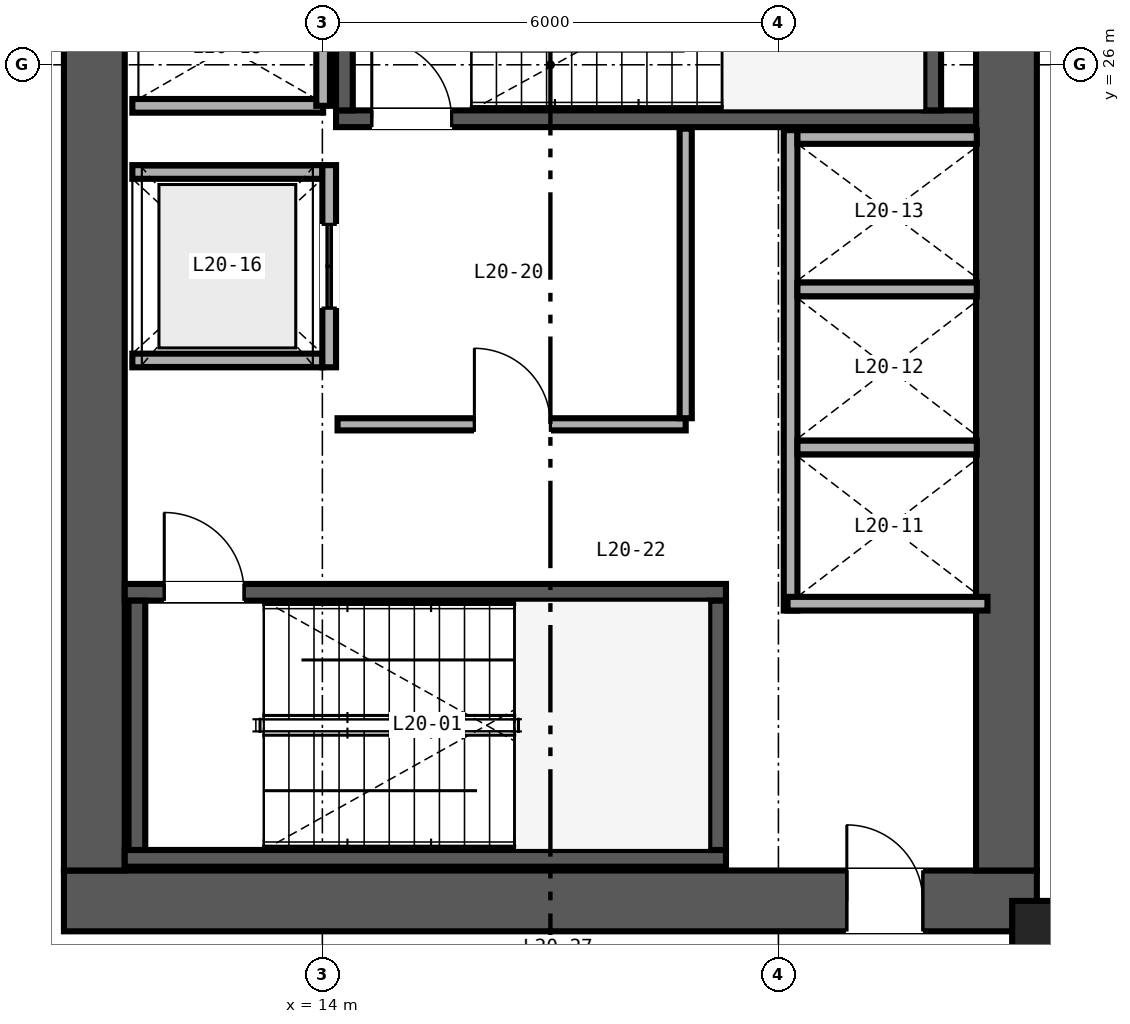
"""IFC4 building model, lengths in metres.
Left out: names, types, materials, properties, quantities, classifications, styles, units other than length and angle.
Written with IfcOpenShell. Run it as: python <this file> out.ifc"""

import sys

from ifc_helpers import new_model, si_unit, direction, frame, frame_2d, origin, origin_2d, place, context, subcontext, project, spatial, rectangle, hollow_rectangle, extrude, source, transform, mapped, element, fill, save


model = new_model("IFC4")
c1 = context("Model", 3, precision=1e-05, world=origin(), true_north=direction((0.0, 1.0)))
c2 = subcontext(c1, "Body", "Model", "MODEL_VIEW")
j1 = project(units=[si_unit("LENGTHUNIT", "METRE"), si_unit("PLANEANGLEUNIT", "RADIAN")], contexts=[c1])
p1 = place(None, origin())
s1 = spatial("IfcSite", under=j1, at=p1, CompositionType="ELEMENT")
p2 = place(p1, origin())
s2 = spatial("IfcBuilding", under=s1, at=p2, CompositionType="ELEMENT")
p3 = place(p2, frame((0.0, 0.0, 81.6)))
s3 = spatial("IfcBuildingStorey", under=s2, at=p3, CompositionType="ELEMENT", Elevation=81.6)
p4 = place(p3, frame((10.6, 15.0, 0.0), z_axis=(0.0, 0.0, 1.0), x_axis=(1.0, 0.0, 0.0)))
e1 = element("IfcWall", 1, at=p4, inside=s3, PredefinedType="SHEAR", context=c2, shape_type="SweptSolid", body=[
    extrude(rectangle(XDim=12.8, YDim=0.8, at=frame_2d((6.4, 0.0))), origin(), (0.0, 0.0, 1.0), 3.28),
])
p5 = place(p4, frame((10.3, 0.0, 0.0)))
e2 = element("IfcOpeningElement", 2, at=p5, cuts=e1, PredefinedType="OPENING", context=c2, shape_type="SweptSolid", body=[
    extrude(rectangle(XDim=1.0, YDim=2.15, at=frame_2d((0.5, 1.075))), frame((0.0, 0.41, 0.0), z_axis=(0.0, -1.0, 0.0), x_axis=(1.0, 0.0, 0.0)), (0.0, 0.0, 1.0), 0.82),
])
for number, where, z_axis, x_axis in (
    (3, (11.0, 15.4, 0.0), (0.0, 0.0, 1.0), (0.0, 1.0, 0.0)),
    (4, (23.0, 15.4, 0.0), (0.0, 0.0, 1.0), (0.0, 1.0, 0.0)),
):
    element("IfcWall", number, at=place(p3, frame(where, z_axis=z_axis, x_axis=x_axis)), inside=s3, PredefinedType="SHEAR", context=c2, shape_type="SweptSolid", body=[
        extrude(rectangle(XDim=21.2, YDim=0.8, at=frame_2d((10.6, 0.0))), origin(), (0.0, 0.0, 1.0), 3.28),
    ])
p6 = place(p3, frame((11.4, 15.56, 0.0), z_axis=(0.0, 0.0, 1.0), x_axis=(1.0, 0.0, 0.0)))
e5 = element("IfcWall", 5, at=p6, inside=s3, PredefinedType="SHEAR", context=c2, shape_type="SweptSolid", body=[
    extrude(rectangle(XDim=7.91, YDim=0.22, at=frame_2d((3.955, 0.0))), origin(), (0.0, 0.0, 1.0), 3.4),
])
p7 = place(p3, frame((11.4, 19.06, 0.0), z_axis=(0.0, 0.0, 1.0), x_axis=(1.0, 0.0, 0.0)))
e6 = element("IfcWall", 6, at=p7, inside=s3, PredefinedType="SHEAR", context=c2, shape_type="SweptSolid", body=[
    extrude(rectangle(XDim=7.91, YDim=0.22, at=frame_2d((3.955, 0.0))), origin(), (0.0, 0.0, 1.0), 3.4),
])
p8 = place(p7, frame((0.52, 0.0, 0.0)))
e7 = element("IfcOpeningElement", 7, at=p8, cuts=e6, PredefinedType="OPENING", context=c2, shape_type="SweptSolid", body=[
    extrude(rectangle(XDim=1.05, YDim=2.15, at=frame_2d((0.525, 1.075))), frame((0.0, 0.12, 0.0), z_axis=(0.0, -1.0, 0.0), x_axis=(1.0, 0.0, 0.0)), (0.0, 0.0, 1.0), 0.24),
])
for number, where, z_axis, x_axis in (
    (8, (11.56, 15.67, 0.0), (0.0, 0.0, 1.0), (0.0, 1.0, 0.0)),
    (9, (19.2, 15.67, 0.0), (0.0, 0.0, 1.0), (0.0, 1.0, 0.0)),
):
    element("IfcWall", number, at=place(p3, frame(where, z_axis=z_axis, x_axis=x_axis)), inside=s3, PredefinedType="SHEAR", context=c2, shape_type="SweptSolid", body=[
        extrude(rectangle(XDim=3.28, YDim=0.22, at=frame_2d((1.64, 0.0))), origin(), (0.0, 0.0, 1.0), 3.4),
    ])
p9 = place(p3, frame((14.18, 25.29, 0.0), z_axis=(0.0, 0.0, 1.0), x_axis=(1.0, 0.0, 0.0)))
e10 = element("IfcWall", 10, at=p9, inside=s3, PredefinedType="SHEAR", context=c2, shape_type="SweptSolid", body=[
    extrude(rectangle(XDim=8.42, YDim=0.22, at=frame_2d((4.21, 0.0))), origin(), (0.0, 0.0, 1.0), 3.4),
])
p10 = place(p9, frame((0.47, 0.0, 0.0)))
e11 = element("IfcOpeningElement", 11, at=p10, cuts=e10, PredefinedType="OPENING", context=c2, shape_type="SweptSolid", body=[
    extrude(rectangle(XDim=1.05, YDim=2.15, at=frame_2d((0.525, 1.075))), frame((0.0, 0.12, 0.0), z_axis=(0.0, -1.0, 0.0), x_axis=(1.0, 0.0, 0.0)), (0.0, 0.0, 1.0), 0.24),
])
for number, where, z_axis, x_axis in (
    (12, (14.29, 25.4, 0.0), (0.0, 0.0, 1.0), (0.0, 1.0, 0.0)),
    (13, (22.03, 25.4, 0.0), (0.0, 0.0, 1.0), (0.0, 1.0, 0.0)),
):
    element("IfcWall", number, at=place(p3, frame(where, z_axis=z_axis, x_axis=x_axis)), inside=s3, PredefinedType="SHEAR", context=c2, shape_type="SweptSolid", body=[
        extrude(rectangle(XDim=3.28, YDim=0.22, at=frame_2d((1.64, 0.0))), origin(), (0.0, 0.0, 1.0), 3.4),
    ])
m1 = source(origin(), c2, "Body", "SweptSolid", [
    extrude(hollow_rectangle(XDim=0.85, YDim=0.9, WallThickness=0.04, at=origin_2d()), origin(), (0.0, 0.0, 1.0), 3.28),
])
p11 = place(p3, frame((23.5, 14.55, 0.0), z_axis=(0.0, 0.0, 1.0), x_axis=(1.0, 0.0, 0.0)))
e14 = element("IfcColumn", 14, at=p11, inside=s3, PredefinedType="COLUMN", context=c2, shape_type="MappedRepresentation", body=[
    mapped(m1, transform((0.0, 0.0, 0.0), scale=1.0)),
])
p12 = place(p3, frame((20.16, 18.82, 0.0), z_axis=(0.0, 0.0, 1.0), x_axis=(0.0, 1.0, 0.0)))
e15 = element("IfcWall", 15, at=p12, inside=s3, PredefinedType="SOLIDWALL", context=c2, shape_type="SweptSolid", body=[
    extrude(rectangle(XDim=6.32, YDim=0.18, at=frame_2d((3.16, 0.0))), origin(), (0.0, 0.0, 1.0), 2.36),
])
p13 = place(p3, frame((20.12, 18.91, 0.0), z_axis=(0.0, 0.0, 1.0), x_axis=(1.0, 0.0, 0.0)))
e16 = element("IfcWall", 16, at=p13, inside=s3, PredefinedType="SOLIDWALL", context=c2, shape_type="SweptSolid", body=[
    extrude(rectangle(XDim=2.63, YDim=0.18, at=frame_2d((1.315, 0.0))), origin(), (0.0, 0.0, 1.0), 3.28),
])
p14 = place(p3, frame((20.25, 25.05, 0.0), z_axis=(0.0, 0.0, 1.0), x_axis=(1.0, 0.0, 0.0)))
e17 = element("IfcWall", 17, at=p14, inside=s3, PredefinedType="SOLIDWALL", context=c2, shape_type="SweptSolid", body=[
    extrude(rectangle(XDim=2.36, YDim=0.18, at=frame_2d((1.18, 0.0))), origin(), (0.0, 0.0, 1.0), 3.28),
])
p15 = place(p3, frame((20.25, 20.965, 0.0), z_axis=(0.0, 0.0, 1.0), x_axis=(1.0, 0.0, 0.0)))
e18 = element("IfcWall", 18, at=p15, inside=s3, PredefinedType="SOLIDWALL", context=c2, shape_type="SweptSolid", body=[
    extrude(rectangle(XDim=2.36, YDim=0.18, at=frame_2d((1.18, 0.0))), origin(), (0.0, 0.0, 1.0), 2.36),
])
p16 = place(p3, frame((20.25, 23.045, 0.0), z_axis=(0.0, 0.0, 1.0), x_axis=(1.0, 0.0, 0.0)))
e19 = element("IfcWall", 19, at=p16, inside=s3, PredefinedType="SOLIDWALL", context=c2, shape_type="SweptSolid", body=[
    extrude(rectangle(XDim=2.36, YDim=0.18, at=frame_2d((1.18, 0.0))), origin(), (0.0, 0.0, 1.0), 3.28),
])
for number, where, z_axis, x_axis in (
    (20, (11.5, 22.11, 0.0), (0.0, 0.0, 1.0), (1.0, 0.0, 0.0)),
    (21, (11.5, 24.59, 0.0), (0.0, 0.0, 1.0), (1.0, 0.0, 0.0)),
):
    element("IfcWall", number, at=place(p3, frame(where, z_axis=z_axis, x_axis=x_axis)), inside=s3, PredefinedType="SOLIDWALL", context=c2, shape_type="SweptSolid", body=[
        extrude(rectangle(XDim=2.5, YDim=0.18, at=frame_2d((1.25, 0.0))), origin(), (0.0, 0.0, 1.0), 3.28),
    ])
p17 = place(p3, frame((14.09, 22.02, 0.0), z_axis=(0.0, 0.0, 1.0), x_axis=(0.0, 1.0, 0.0)))
e22 = element("IfcWall", 22, at=p17, inside=s3, PredefinedType="SOLIDWALL", context=c2, shape_type="SweptSolid", body=[
    extrude(rectangle(XDim=2.66, YDim=0.18, at=frame_2d((1.33, 0.0))), origin(), (0.0, 0.0, 1.0), 3.28),
])
p18 = place(p17, frame((0.78, 0.0, 0.0)))
e23 = element("IfcOpeningElement", 23, at=p18, cuts=e22, PredefinedType="OPENING", context=c2, shape_type="SweptSolid", body=[
    extrude(rectangle(XDim=1.1, YDim=2.2, at=frame_2d((0.55, 1.1))), frame((0.0, 0.1, 0.0), z_axis=(0.0, -1.0, 0.0), x_axis=(1.0, 0.0, 0.0)), (0.0, 0.0, 1.0), 0.2),
])
p19 = place(p3, frame((11.5, 25.46, 0.0), z_axis=(0.0, 0.0, 1.0), x_axis=(1.0, 0.0, 0.0)))
e24 = element("IfcWall", 24, at=p19, inside=s3, PredefinedType="SOLIDWALL", context=c2, shape_type="SweptSolid", body=[
    extrude(rectangle(XDim=2.51, YDim=0.18, at=frame_2d((1.255, 0.0))), origin(), (0.0, 0.0, 1.0), 3.28),
])
p20 = place(p3, frame((14.01, 25.46, 0.0), z_axis=(0.0, 0.0, 1.0), x_axis=(0.0, 1.0, 0.0)))
e25 = element("IfcWall", 25, at=p20, inside=s3, PredefinedType="SOLIDWALL", context=c2, shape_type="SweptSolid", body=[
    extrude(rectangle(XDim=3.08, YDim=0.18, at=frame_2d((1.54, 0.0))), origin(), (0.0, 0.0, 1.0), 3.28),
])
p21 = place(p3, frame((14.2, 21.27, 0.0), z_axis=(0.0, 0.0, 1.0), x_axis=(1.0, 0.0, 0.0)))
e26 = element("IfcWall", 26, at=p21, inside=s3, PredefinedType="PARTITIONING", context=c2, shape_type="SweptSolid", body=[
    extrude(rectangle(XDim=4.58, YDim=0.16, at=frame_2d((2.29, 0.0))), origin(), (0.0, 0.0, 1.0), 3.28),
])
p22 = place(p21, frame((1.8, 0.0, 0.0)))
e27 = element("IfcOpeningElement", 27, at=p22, cuts=e26, PredefinedType="OPENING", context=c2, shape_type="SweptSolid", body=[
    extrude(rectangle(XDim=1.0, YDim=2.15, at=frame_2d((0.5, 1.075))), frame((0.0, 0.09, 0.0), z_axis=(0.0, -1.0, 0.0), x_axis=(1.0, 0.0, 0.0)), (0.0, 0.0, 1.0), 0.18),
])
p23 = place(p3, frame((18.78, 21.35, 0.0), z_axis=(0.0, 0.0, 1.0), x_axis=(0.0, 1.0, 0.0)))
e28 = element("IfcWall", 28, at=p23, inside=s3, PredefinedType="PARTITIONING", context=c2, shape_type="SweptSolid", body=[
    extrude(rectangle(XDim=3.81, YDim=0.16, at=frame_2d((1.905, 0.0))), origin(), (0.0, 0.0, 1.0), 3.28),
])
m2 = source(origin(), c2, "Body", "SweptSolid", [
    extrude(rectangle(XDim=1.05, YDim=2.15, at=frame_2d((0.525, 1.075))), frame((0.0, 0.025, 0.0), z_axis=(0.0, -1.0, 0.0), x_axis=(1.0, 0.0, 0.0)), (0.0, 0.0, 1.0), 0.05),
])
p24 = place(p8, origin())
e29 = element("IfcDoor", 29, at=p24, inside=s3, OperationType="SINGLE_SWING_LEFT", PredefinedType="DOOR", context=c2, shape_type="MappedRepresentation", body=[
    mapped(m2, transform((0.0, 0.0, 0.0), scale=1.0)),
])
fill(e7, e29)
p25 = place(p10, origin())
e30 = element("IfcDoor", 30, at=p25, inside=s3, OperationType="SINGLE_SWING_LEFT", PredefinedType="DOOR", context=c2, shape_type="MappedRepresentation", body=[
    mapped(m2, transform((0.0, 0.0, 0.0), scale=1.0)),
])
fill(e11, e30)
m3 = source(origin(), c2, "Body", "SweptSolid", [
    extrude(rectangle(XDim=1.1, YDim=2.2, at=frame_2d((0.55, 1.1))), frame((0.0, 0.025, 0.0), z_axis=(0.0, -1.0, 0.0), x_axis=(1.0, 0.0, 0.0)), (0.0, 0.0, 1.0), 0.05),
])
p26 = place(p18, origin())
e31 = element("IfcDoor", 31, at=p26, inside=s3, OperationType="DOUBLE_DOOR_SLIDING", PredefinedType="DOOR", context=c2, shape_type="MappedRepresentation", body=[
    mapped(m3, transform((0.0, 0.0, 0.0), scale=1.0)),
])
fill(e23, e31)
m4 = source(origin(), c2, "Body", "SweptSolid", [
    extrude(rectangle(XDim=1.0, YDim=2.15, at=frame_2d((0.5, 1.075))), frame((0.0, 0.025, 0.0), z_axis=(0.0, -1.0, 0.0), x_axis=(1.0, 0.0, 0.0)), (0.0, 0.0, 1.0), 0.05),
])
p27 = place(p22, origin())
e32 = element("IfcDoor", 32, at=p27, inside=s3, OperationType="SINGLE_SWING_LEFT", PredefinedType="DOOR", context=c2, shape_type="MappedRepresentation", body=[
    mapped(m4, transform((0.0, 0.0, 0.0), scale=1.0)),
])
fill(e27, e32)
p28 = place(p5, origin())
e33 = element("IfcDoor", 33, at=p28, inside=s3, OperationType="SINGLE_SWING_LEFT", PredefinedType="DOOR", context=c2, shape_type="MappedRepresentation", body=[
    mapped(m4, transform((0.0, 0.0, 0.0), scale=1.0)),
])
fill(e2, e33)
save(model, sys.argv[1])
